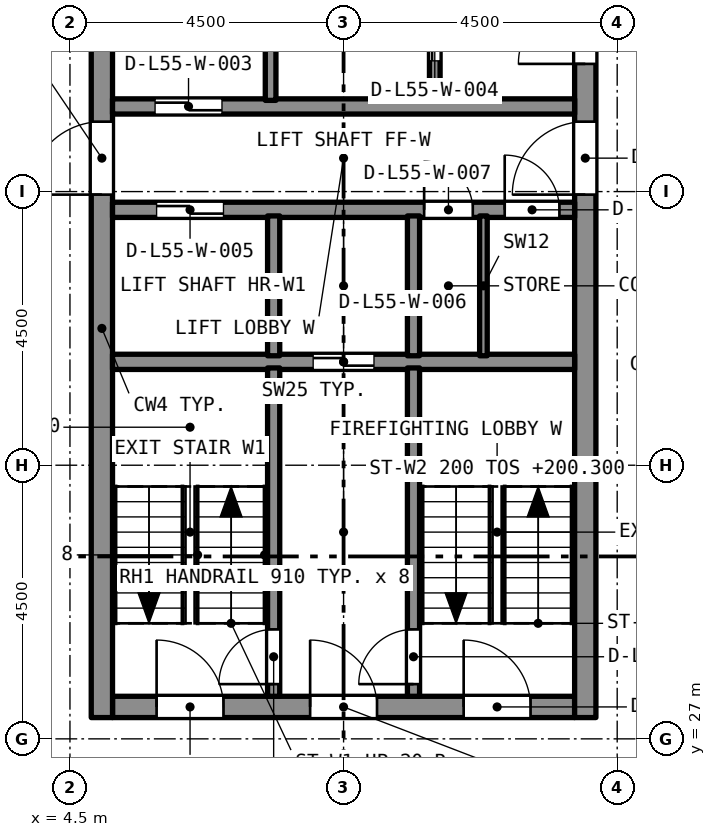
"""IFC4 building model, lengths in metres.
Left out: names, types, materials, properties, quantities, classifications, styles, units other than length and angle.
Written with IfcOpenShell. Run it as: python <this file> out.ifc"""

import sys

from ifc_helpers import new_model, si_unit, direction, frame, frame_2d, origin, place, context, subcontext, project, spatial, rectangle, extrude, element, fill, save


model = new_model("IFC4")
c1 = context("Model", 3, precision=1e-05, world=origin(), true_north=direction((0.0, 1.0)))
c2 = subcontext(c1, "Body", "Model", "MODEL_VIEW")
j1 = project(units=[si_unit("LENGTHUNIT", "METRE"), si_unit("PLANEANGLEUNIT", "RADIAN")], contexts=[c1])
p1 = place(None, origin())
s1 = spatial("IfcSite", under=j1, at=p1, CompositionType="ELEMENT")
p2 = place(p1, origin())
s2 = spatial("IfcBuilding", under=s1, at=p2, CompositionType="ELEMENT")
p3 = place(p2, frame((0.0, 0.0, 198.7)))
s3 = spatial("IfcBuildingStorey", under=s2, at=p3, CompositionType="ELEMENT", Elevation=198.7)
p4 = place(p3, frame((5.2, 27.525, 0.0), z_axis=(0.0, 0.0, 1.0), x_axis=(1.0, 0.0, 0.0)))
e1 = element("IfcWall", 1, at=p4, inside=s3, PredefinedType="SOLIDWALL", context=c2, shape_type="SweptSolid", body=[
    extrude(rectangle(XDim=7.6, YDim=0.35, at=frame_2d((3.8, 0.0))), origin(), (0.0, 0.0, 1.0), 3.2),
])
p5 = place(p4, frame((0.725, 0.0, 0.0)))
e2 = element("IfcOpeningElement", 2, at=p5, cuts=e1, PredefinedType="OPENING", context=c2, shape_type="SweptSolid", body=[
    extrude(rectangle(XDim=1.1, YDim=2.1, at=frame_2d((0.55, 1.05))), frame((0.0, 0.185, 0.0), z_axis=(0.0, -1.0, 0.0), x_axis=(1.0, 0.0, 0.0)), (0.0, 0.0, 1.0), 0.37),
])
p6 = place(p4, frame((3.25, 0.0, 0.0)))
e3 = element("IfcOpeningElement", 3, at=p6, cuts=e1, PredefinedType="OPENING", context=c2, shape_type="SweptSolid", body=[
    extrude(rectangle(XDim=1.1, YDim=2.1, at=frame_2d((0.55, 1.05))), frame((0.0, 0.185, 0.0), z_axis=(0.0, -1.0, 0.0), x_axis=(1.0, 0.0, 0.0)), (0.0, 0.0, 1.0), 0.37),
])
p7 = place(p4, frame((5.775, 0.0, 0.0)))
e4 = element("IfcOpeningElement", 4, at=p7, cuts=e1, PredefinedType="OPENING", context=c2, shape_type="SweptSolid", body=[
    extrude(rectangle(XDim=1.1, YDim=2.1, at=frame_2d((0.55, 1.05))), frame((0.0, 0.185, 0.0), z_axis=(0.0, -1.0, 0.0), x_axis=(1.0, 0.0, 0.0)), (0.0, 0.0, 1.0), 0.37),
])
p8 = place(p3, frame((5.025, 27.35, 0.0), z_axis=(0.0, 0.0, 1.0), x_axis=(0.0, 1.0, 0.0)))
e5 = element("IfcWall", 5, at=p8, inside=s3, PredefinedType="SOLIDWALL", context=c2, shape_type="SweptSolid", body=[
    extrude(rectangle(XDim=12.8, YDim=0.35, at=frame_2d((6.4, 0.0))), origin(), (0.0, 0.0, 1.0), 3.2),
])
p9 = place(p8, frame((8.6, 0.0, 0.0)))
e6 = element("IfcOpeningElement", 6, at=p9, cuts=e5, PredefinedType="OPENING", context=c2, shape_type="SweptSolid", body=[
    extrude(rectangle(XDim=1.2, YDim=2.1, at=frame_2d((0.6, 1.05))), frame((0.0, 0.185, 0.0), z_axis=(0.0, -1.0, 0.0), x_axis=(1.0, 0.0, 0.0)), (0.0, 0.0, 1.0), 0.37),
])
p10 = place(p3, frame((12.975, 27.35, 0.0), z_axis=(0.0, 0.0, 1.0), x_axis=(0.0, 1.0, 0.0)))
e7 = element("IfcWall", 7, at=p10, inside=s3, PredefinedType="SOLIDWALL", context=c2, shape_type="SweptSolid", body=[
    extrude(rectangle(XDim=12.8, YDim=0.35, at=frame_2d((6.4, 0.0))), origin(), (0.0, 0.0, 1.0), 3.2),
])
p11 = place(p10, frame((10.75, 0.0, 0.0)))
e8 = element("IfcOpeningElement", 8, at=p11, cuts=e7, PredefinedType="OPENING", context=c2, shape_type="SweptSolid", body=[
    extrude(rectangle(XDim=1.1, YDim=2.1, at=frame_2d((0.55, 1.05))), frame((0.0, 0.185, 0.0), z_axis=(0.0, -1.0, 0.0), x_axis=(1.0, 0.0, 0.0)), (0.0, 0.0, 1.0), 0.37),
])
p12 = place(p10, frame((8.6, 0.0, 0.0)))
e9 = element("IfcOpeningElement", 9, at=p12, cuts=e7, PredefinedType="OPENING", context=c2, shape_type="SweptSolid", body=[
    extrude(rectangle(XDim=1.2, YDim=2.1, at=frame_2d((0.6, 1.05))), frame((0.0, 0.185, 0.0), z_axis=(0.0, -1.0, 0.0), x_axis=(1.0, 0.0, 0.0)), (0.0, 0.0, 1.0), 0.37),
])
p13 = place(p3, frame((5.2, 33.2, 0.0), z_axis=(0.0, 0.0, 1.0), x_axis=(1.0, 0.0, 0.0)))
e10 = element("IfcWall", 10, at=p13, inside=s3, PredefinedType="SOLIDWALL", context=c2, shape_type="SweptSolid", body=[
    extrude(rectangle(XDim=7.6, YDim=0.25, at=frame_2d((3.8, 0.0))), origin(), (0.0, 0.0, 1.0), 2.7),
])
p14 = place(p13, frame((3.3, 0.0, 0.0)))
e11 = element("IfcOpeningElement", 11, at=p14, cuts=e10, PredefinedType="OPENING", context=c2, shape_type="SweptSolid", body=[
    extrude(rectangle(XDim=1.0, YDim=2.1, at=frame_2d((0.5, 1.05))), frame((0.0, 0.135, 0.0), z_axis=(0.0, -1.0, 0.0), x_axis=(1.0, 0.0, 0.0)), (0.0, 0.0, 1.0), 0.27),
])
p15 = place(p3, frame((5.2, 35.7, 0.0), z_axis=(0.0, 0.0, 1.0), x_axis=(1.0, 0.0, 0.0)))
e12 = element("IfcWall", 12, at=p15, inside=s3, PredefinedType="SOLIDWALL", context=c2, shape_type="SweptSolid", body=[
    extrude(rectangle(XDim=7.6, YDim=0.25, at=frame_2d((3.8, 0.0))), origin(), (0.0, 0.0, 1.0), 2.7),
])
p16 = place(p15, frame((0.725, 0.0, 0.0)))
e13 = element("IfcOpeningElement", 13, at=p16, cuts=e12, PredefinedType="OPENING", context=c2, shape_type="SweptSolid", body=[
    extrude(rectangle(XDim=1.1, YDim=2.4, at=frame_2d((0.55, 1.2))), frame((0.0, 0.135, 0.0), z_axis=(0.0, -1.0, 0.0), x_axis=(1.0, 0.0, 0.0)), (0.0, 0.0, 1.0), 0.27),
])
p17 = place(p15, frame((5.125, 0.0, 0.0)))
e14 = element("IfcOpeningElement", 14, at=p17, cuts=e12, PredefinedType="OPENING", context=c2, shape_type="SweptSolid", body=[
    extrude(rectangle(XDim=0.8, YDim=2.1, at=frame_2d((0.4, 1.05))), frame((0.0, 0.135, 0.0), z_axis=(0.0, -1.0, 0.0), x_axis=(1.0, 0.0, 0.0)), (0.0, 0.0, 1.0), 0.27),
])
p18 = place(p15, frame((6.45, 0.0, 0.0)))
e15 = element("IfcOpeningElement", 15, at=p18, cuts=e12, PredefinedType="OPENING", context=c2, shape_type="SweptSolid", body=[
    extrude(rectangle(XDim=0.9, YDim=2.1, at=frame_2d((0.45, 1.05))), frame((0.0, 0.135, 0.0), z_axis=(0.0, -1.0, 0.0), x_axis=(1.0, 0.0, 0.0)), (0.0, 0.0, 1.0), 0.27),
])
p19 = place(p3, frame((5.2, 37.4, 0.0), z_axis=(0.0, 0.0, 1.0), x_axis=(1.0, 0.0, 0.0)))
e16 = element("IfcWall", 16, at=p19, inside=s3, PredefinedType="SOLIDWALL", context=c2, shape_type="SweptSolid", body=[
    extrude(rectangle(XDim=7.6, YDim=0.25, at=frame_2d((3.8, 0.0))), origin(), (0.0, 0.0, 1.0), 2.7),
])
p20 = place(p19, frame((0.7, 0.0, 0.0)))
e17 = element("IfcOpeningElement", 17, at=p20, cuts=e16, PredefinedType="OPENING", context=c2, shape_type="SweptSolid", body=[
    extrude(rectangle(XDim=1.1, YDim=2.4, at=frame_2d((0.55, 1.2))), frame((0.0, 0.135, 0.0), z_axis=(0.0, -1.0, 0.0), x_axis=(1.0, 0.0, 0.0)), (0.0, 0.0, 1.0), 0.27),
])
p21 = place(p3, frame((7.85, 27.7, 0.0), z_axis=(0.0, 0.0, 1.0), x_axis=(0.0, 1.0, 0.0)))
e18 = element("IfcWall", 18, at=p21, inside=s3, PredefinedType="SOLIDWALL", context=c2, shape_type="SweptSolid", body=[
    extrude(rectangle(XDim=5.4, YDim=0.2, at=frame_2d((2.7, 0.0))), origin(), (0.0, 0.0, 1.0), 2.7),
])
p22 = place(p21, frame((0.2, 0.0, 0.0)))
e19 = element("IfcOpeningElement", 19, at=p22, cuts=e18, PredefinedType="OPENING", context=c2, shape_type="SweptSolid", body=[
    extrude(rectangle(XDim=0.9, YDim=2.1, at=frame_2d((0.45, 1.05))), frame((0.0, 0.11, 0.0), z_axis=(0.0, -1.0, 0.0), x_axis=(1.0, 0.0, 0.0)), (0.0, 0.0, 1.0), 0.22),
])
p23 = place(p3, frame((10.15, 27.7, 0.0), z_axis=(0.0, 0.0, 1.0), x_axis=(0.0, 1.0, 0.0)))
e20 = element("IfcWall", 20, at=p23, inside=s3, PredefinedType="SOLIDWALL", context=c2, shape_type="SweptSolid", body=[
    extrude(rectangle(XDim=5.4, YDim=0.2, at=frame_2d((2.7, 0.0))), origin(), (0.0, 0.0, 1.0), 2.7),
])
p24 = place(p23, frame((0.2, 0.0, 0.0)))
e21 = element("IfcOpeningElement", 21, at=p24, cuts=e20, PredefinedType="OPENING", context=c2, shape_type="SweptSolid", body=[
    extrude(rectangle(XDim=0.9, YDim=2.1, at=frame_2d((0.45, 1.05))), frame((0.0, 0.11, 0.0), z_axis=(0.0, -1.0, 0.0), x_axis=(1.0, 0.0, 0.0)), (0.0, 0.0, 1.0), 0.22),
])
for number, where, z_axis, x_axis in (
    (22, (7.85, 33.3, 0.0), (0.0, 0.0, 1.0), (0.0, 1.0, 0.0)),
    (23, (10.15, 33.3, 0.0), (0.0, 0.0, 1.0), (0.0, 1.0, 0.0)),
):
    element("IfcWall", number, at=place(p3, frame(where, z_axis=z_axis, x_axis=x_axis)), inside=s3, PredefinedType="SOLIDWALL", context=c2, shape_type="SweptSolid", body=[
        extrude(rectangle(XDim=2.3, YDim=0.2, at=frame_2d((1.15, 0.0))), origin(), (0.0, 0.0, 1.0), 2.7),
    ])
p25 = place(p3, frame((7.8, 37.5, 0.0), z_axis=(0.0, 0.0, 1.0), x_axis=(0.0, 1.0, 0.0)))
e24 = element("IfcWall", 24, at=p25, inside=s3, PredefinedType="SOLIDWALL", context=c2, shape_type="SweptSolid", body=[
    extrude(rectangle(XDim=2.3, YDim=0.175, at=frame_2d((1.15, 0.0))), origin(), (0.0, 0.0, 1.0), 2.7),
])
p26 = place(p3, frame((10.5, 37.5, 0.0), z_axis=(0.0, 0.0, 1.0), x_axis=(0.0, 1.0, 0.0)))
e25 = element("IfcWall", 25, at=p26, inside=s3, PredefinedType="SOLIDWALL", context=c2, shape_type="SweptSolid", body=[
    extrude(rectangle(XDim=2.3, YDim=0.175, at=frame_2d((1.15, 0.0))), origin(), (0.0, 0.0, 1.0), 2.7),
])
p27 = place(p26, frame((0.65, 0.0, 0.0)))
e26 = element("IfcOpeningElement", 26, at=p27, cuts=e25, PredefinedType="OPENING", context=c2, shape_type="SweptSolid", body=[
    extrude(rectangle(XDim=1.0, YDim=2.1, at=frame_2d((0.5, 1.05))), frame((0.0, 0.097, 0.0), z_axis=(0.0, -1.0, 0.0), x_axis=(1.0, 0.0, 0.0)), (0.0, 0.0, 1.0), 0.195),
])
p28 = place(p3, frame((11.3, 33.3, 0.0), z_axis=(0.0, 0.0, 1.0), x_axis=(0.0, 1.0, 0.0)))
e27 = element("IfcWall", 27, at=p28, inside=s3, PredefinedType="PARTITIONING", context=c2, shape_type="SweptSolid", body=[
    extrude(rectangle(XDim=2.3, YDim=0.125, at=frame_2d((1.15, 0.0))), origin(), (0.0, 0.0, 1.0), 2.7),
])
p29 = place(p22, origin())
e28 = element("IfcDoor", 28, at=p29, inside=s3, OperationType="SINGLE_SWING_LEFT", PredefinedType="DOOR", context=c2, shape_type="SweptSolid", body=[
    extrude(rectangle(XDim=0.9, YDim=2.1, at=frame_2d((0.45, 1.05))), frame((0.0, 0.025, 0.0), z_axis=(0.0, -1.0, 0.0), x_axis=(1.0, 0.0, 0.0)), (0.0, 0.0, 1.0), 0.05),
])
fill(e19, e28)
p30 = place(p24, origin())
e29 = element("IfcDoor", 29, at=p30, inside=s3, OperationType="SINGLE_SWING_LEFT", PredefinedType="DOOR", context=c2, shape_type="SweptSolid", body=[
    extrude(rectangle(XDim=0.9, YDim=2.1, at=frame_2d((0.45, 1.05))), frame((0.0, 0.025, 0.0), z_axis=(0.0, -1.0, 0.0), x_axis=(1.0, 0.0, 0.0)), (0.0, 0.0, 1.0), 0.05),
])
fill(e21, e29)
p31 = place(p20, origin())
e30 = element("IfcDoor", 30, at=p31, inside=s3, OperationType="SLIDING_TO_LEFT", PredefinedType="DOOR", context=c2, shape_type="SweptSolid", body=[
    extrude(rectangle(XDim=1.1, YDim=2.4, at=frame_2d((0.55, 1.2))), frame((0.0, 0.025, 0.0), z_axis=(0.0, -1.0, 0.0), x_axis=(1.0, 0.0, 0.0)), (0.0, 0.0, 1.0), 0.05),
])
fill(e17, e30)
p32 = place(p27, origin())
e31 = element("IfcDoor", 31, at=p32, inside=s3, OperationType="SLIDING_TO_LEFT", PredefinedType="DOOR", context=c2, shape_type="SweptSolid", body=[
    extrude(rectangle(XDim=1.0, YDim=2.1, at=frame_2d((0.5, 1.05))), frame((0.0, 0.025, 0.0), z_axis=(0.0, -1.0, 0.0), x_axis=(1.0, 0.0, 0.0)), (0.0, 0.0, 1.0), 0.05),
])
fill(e26, e31)
p33 = place(p16, origin())
e32 = element("IfcDoor", 32, at=p33, inside=s3, OperationType="SLIDING_TO_LEFT", PredefinedType="DOOR", context=c2, shape_type="SweptSolid", body=[
    extrude(rectangle(XDim=1.1, YDim=2.4, at=frame_2d((0.55, 1.2))), frame((0.0, 0.025, 0.0), z_axis=(0.0, -1.0, 0.0), x_axis=(1.0, 0.0, 0.0)), (0.0, 0.0, 1.0), 0.05),
])
fill(e13, e32)
p34 = place(p14, origin())
e33 = element("IfcDoor", 33, at=p34, inside=s3, OperationType="SLIDING_TO_LEFT", PredefinedType="DOOR", context=c2, shape_type="SweptSolid", body=[
    extrude(rectangle(XDim=1.0, YDim=2.1, at=frame_2d((0.5, 1.05))), frame((0.0, 0.025, 0.0), z_axis=(0.0, -1.0, 0.0), x_axis=(1.0, 0.0, 0.0)), (0.0, 0.0, 1.0), 0.05),
])
fill(e11, e33)
p35 = place(p17, origin())
e34 = element("IfcDoor", 34, at=p35, inside=s3, OperationType="SINGLE_SWING_LEFT", PredefinedType="DOOR", context=c2, shape_type="SweptSolid", body=[
    extrude(rectangle(XDim=0.8, YDim=2.1, at=frame_2d((0.4, 1.05))), frame((0.0, 0.025, 0.0), z_axis=(0.0, -1.0, 0.0), x_axis=(1.0, 0.0, 0.0)), (0.0, 0.0, 1.0), 0.05),
])
fill(e14, e34)
p36 = place(p18, origin())
e35 = element("IfcDoor", 35, at=p36, inside=s3, OperationType="SINGLE_SWING_LEFT", PredefinedType="DOOR", context=c2, shape_type="SweptSolid", body=[
    extrude(rectangle(XDim=0.9, YDim=2.1, at=frame_2d((0.45, 1.05))), frame((0.0, 0.025, 0.0), z_axis=(0.0, -1.0, 0.0), x_axis=(1.0, 0.0, 0.0)), (0.0, 0.0, 1.0), 0.05),
])
fill(e15, e35)
p37 = place(p5, origin())
e36 = element("IfcDoor", 36, at=p37, inside=s3, OperationType="SINGLE_SWING_LEFT", PredefinedType="DOOR", context=c2, shape_type="SweptSolid", body=[
    extrude(rectangle(XDim=1.1, YDim=2.1, at=frame_2d((0.55, 1.05))), frame((0.0, 0.025, 0.0), z_axis=(0.0, -1.0, 0.0), x_axis=(1.0, 0.0, 0.0)), (0.0, 0.0, 1.0), 0.05),
])
fill(e2, e36)
p38 = place(p6, origin())
e37 = element("IfcDoor", 37, at=p38, inside=s3, OperationType="SINGLE_SWING_LEFT", PredefinedType="DOOR", context=c2, shape_type="SweptSolid", body=[
    extrude(rectangle(XDim=1.1, YDim=2.1, at=frame_2d((0.55, 1.05))), frame((0.0, 0.025, 0.0), z_axis=(0.0, -1.0, 0.0), x_axis=(1.0, 0.0, 0.0)), (0.0, 0.0, 1.0), 0.05),
])
fill(e3, e37)
p39 = place(p7, origin())
e38 = element("IfcDoor", 38, at=p39, inside=s3, OperationType="SINGLE_SWING_LEFT", PredefinedType="DOOR", context=c2, shape_type="SweptSolid", body=[
    extrude(rectangle(XDim=1.1, YDim=2.1, at=frame_2d((0.55, 1.05))), frame((0.0, 0.025, 0.0), z_axis=(0.0, -1.0, 0.0), x_axis=(1.0, 0.0, 0.0)), (0.0, 0.0, 1.0), 0.05),
])
fill(e4, e38)
p40 = place(p11, origin())
e39 = element("IfcDoor", 39, at=p40, inside=s3, OperationType="SINGLE_SWING_LEFT", PredefinedType="DOOR", context=c2, shape_type="SweptSolid", body=[
    extrude(rectangle(XDim=1.1, YDim=2.1, at=frame_2d((0.55, 1.05))), frame((0.0, 0.025, 0.0), z_axis=(0.0, -1.0, 0.0), x_axis=(1.0, 0.0, 0.0)), (0.0, 0.0, 1.0), 0.05),
])
fill(e8, e39)
p41 = place(p9, origin())
e40 = element("IfcDoor", 40, at=p41, inside=s3, OperationType="SINGLE_SWING_LEFT", PredefinedType="DOOR", context=c2, shape_type="SweptSolid", body=[
    extrude(rectangle(XDim=1.2, YDim=2.1, at=frame_2d((0.6, 1.05))), frame((0.0, 0.025, 0.0), z_axis=(0.0, -1.0, 0.0), x_axis=(1.0, 0.0, 0.0)), (0.0, 0.0, 1.0), 0.05),
])
fill(e6, e40)
p42 = place(p12, origin())
e41 = element("IfcDoor", 41, at=p42, inside=s3, OperationType="SINGLE_SWING_LEFT", PredefinedType="DOOR", context=c2, shape_type="SweptSolid", body=[
    extrude(rectangle(XDim=1.2, YDim=2.1, at=frame_2d((0.6, 1.05))), frame((0.0, 0.025, 0.0), z_axis=(0.0, -1.0, 0.0), x_axis=(1.0, 0.0, 0.0)), (0.0, 0.0, 1.0), 0.05),
])
fill(e9, e41)
save(model, sys.argv[1])
